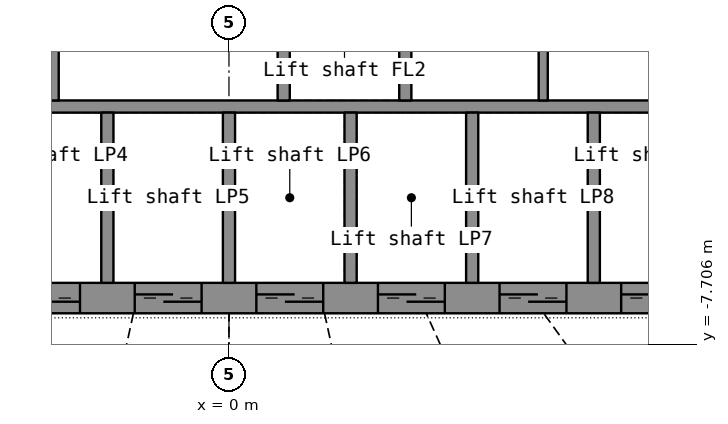
"""IFC4 building model, lengths in metres.
Left out: names, types, materials, properties, quantities, classifications, styles, units other than length and angle.
Written with IfcOpenShell. Run it as: python <this file> out.ifc"""

import sys

from ifc_helpers import new_model, si_unit, direction, frame, frame_2d, origin, place, context, subcontext, project, spatial, rectangle, extrude, element, fill, save


model = new_model("IFC4")
c1 = context("Model", 3, precision=1e-05, world=origin(), true_north=direction((0.0, 1.0)))
c2 = subcontext(c1, "Body", "Model", "MODEL_VIEW")
j1 = project(units=[si_unit("LENGTHUNIT", "METRE"), si_unit("PLANEANGLEUNIT", "RADIAN")], contexts=[c1])
p1 = place(None, origin())
s1 = spatial("IfcSite", under=j1, at=p1, CompositionType="ELEMENT")
p2 = place(p1, origin())
s2 = spatial("IfcBuilding", under=s1, at=p2, CompositionType="ELEMENT")
p3 = place(p2, frame((0.0, 0.0, 145.2)))
s3 = spatial("IfcBuildingStorey", under=s2, at=p3, CompositionType="ELEMENT", Elevation=145.2)
p4 = place(p3, frame((-11.5, -6.95, 0.0), z_axis=(0.0, 0.0, 1.0), x_axis=(1.0, 0.0, 0.0)))
e1 = element("IfcWall", 1, at=p4, inside=s3, PredefinedType="SHEAR", context=c2, shape_type="SweptSolid", body=[
    extrude(rectangle(XDim=23.0, YDim=0.5, at=frame_2d((11.5, 0.0))), origin(), (0.0, 0.0, 1.0), 7.0),
])
p5 = place(p4, frame((1.95, 0.0, 0.0)))
e2 = element("IfcOpeningElement", 2, at=p5, cuts=e1, PredefinedType="OPENING", context=c2, shape_type="SweptSolid", body=[
    extrude(rectangle(XDim=1.1, YDim=2.2, at=frame_2d((0.55, 1.1))), frame((0.0, 0.26, 0.0), z_axis=(0.0, -1.0, 0.0), x_axis=(1.0, 0.0, 0.0)), (0.0, 0.0, 1.0), 0.52),
])
p6 = place(p4, frame((3.95, 0.0, 0.0)))
e3 = element("IfcOpeningElement", 3, at=p6, cuts=e1, PredefinedType="OPENING", context=c2, shape_type="SweptSolid", body=[
    extrude(rectangle(XDim=1.1, YDim=2.2, at=frame_2d((0.55, 1.1))), frame((0.0, 0.26, 0.0), z_axis=(0.0, -1.0, 0.0), x_axis=(1.0, 0.0, 0.0)), (0.0, 0.0, 1.0), 0.52),
])
p7 = place(p4, frame((5.95, 0.0, 0.0)))
e4 = element("IfcOpeningElement", 4, at=p7, cuts=e1, PredefinedType="OPENING", context=c2, shape_type="SweptSolid", body=[
    extrude(rectangle(XDim=1.1, YDim=2.2, at=frame_2d((0.55, 1.1))), frame((0.0, 0.26, 0.0), z_axis=(0.0, -1.0, 0.0), x_axis=(1.0, 0.0, 0.0)), (0.0, 0.0, 1.0), 0.52),
])
p8 = place(p4, frame((7.95, 0.0, 0.0)))
e5 = element("IfcOpeningElement", 5, at=p8, cuts=e1, PredefinedType="OPENING", context=c2, shape_type="SweptSolid", body=[
    extrude(rectangle(XDim=1.1, YDim=2.2, at=frame_2d((0.55, 1.1))), frame((0.0, 0.26, 0.0), z_axis=(0.0, -1.0, 0.0), x_axis=(1.0, 0.0, 0.0)), (0.0, 0.0, 1.0), 0.52),
])
p9 = place(p4, frame((9.95, 0.0, 0.0)))
e6 = element("IfcOpeningElement", 6, at=p9, cuts=e1, PredefinedType="OPENING", context=c2, shape_type="SweptSolid", body=[
    extrude(rectangle(XDim=1.1, YDim=2.2, at=frame_2d((0.55, 1.1))), frame((0.0, 0.26, 0.0), z_axis=(0.0, -1.0, 0.0), x_axis=(1.0, 0.0, 0.0)), (0.0, 0.0, 1.0), 0.52),
])
p10 = place(p4, frame((11.95, 0.0, 0.0)))
e7 = element("IfcOpeningElement", 7, at=p10, cuts=e1, PredefinedType="OPENING", context=c2, shape_type="SweptSolid", body=[
    extrude(rectangle(XDim=1.1, YDim=2.2, at=frame_2d((0.55, 1.1))), frame((0.0, 0.26, 0.0), z_axis=(0.0, -1.0, 0.0), x_axis=(1.0, 0.0, 0.0)), (0.0, 0.0, 1.0), 0.52),
])
p11 = place(p4, frame((13.95, 0.0, 0.0)))
e8 = element("IfcOpeningElement", 8, at=p11, cuts=e1, PredefinedType="OPENING", context=c2, shape_type="SweptSolid", body=[
    extrude(rectangle(XDim=1.1, YDim=2.2, at=frame_2d((0.55, 1.1))), frame((0.0, 0.26, 0.0), z_axis=(0.0, -1.0, 0.0), x_axis=(1.0, 0.0, 0.0)), (0.0, 0.0, 1.0), 0.52),
])
p12 = place(p4, frame((15.95, 0.0, 0.0)))
e9 = element("IfcOpeningElement", 9, at=p12, cuts=e1, PredefinedType="OPENING", context=c2, shape_type="SweptSolid", body=[
    extrude(rectangle(XDim=1.1, YDim=2.2, at=frame_2d((0.55, 1.1))), frame((0.0, 0.26, 0.0), z_axis=(0.0, -1.0, 0.0), x_axis=(1.0, 0.0, 0.0)), (0.0, 0.0, 1.0), 0.52),
])
p13 = place(p4, frame((17.95, 0.0, 0.0)))
e10 = element("IfcOpeningElement", 10, at=p13, cuts=e1, PredefinedType="OPENING", context=c2, shape_type="SweptSolid", body=[
    extrude(rectangle(XDim=1.1, YDim=2.2, at=frame_2d((0.55, 1.1))), frame((0.0, 0.26, 0.0), z_axis=(0.0, -1.0, 0.0), x_axis=(1.0, 0.0, 0.0)), (0.0, 0.0, 1.0), 0.52),
])
p14 = place(p4, frame((19.95, 0.0, 0.0)))
e11 = element("IfcOpeningElement", 11, at=p14, cuts=e1, PredefinedType="OPENING", context=c2, shape_type="SweptSolid", body=[
    extrude(rectangle(XDim=1.1, YDim=2.2, at=frame_2d((0.55, 1.1))), frame((0.0, 0.26, 0.0), z_axis=(0.0, -1.0, 0.0), x_axis=(1.0, 0.0, 0.0)), (0.0, 0.0, 1.0), 0.52),
])
p15 = place(p4, frame((0.3, 0.0, 0.0)))
e12 = element("IfcOpeningElement", 12, at=p15, cuts=e1, PredefinedType="OPENING", context=c2, shape_type="SweptSolid", body=[
    extrude(rectangle(XDim=0.8, YDim=2.05, at=frame_2d((0.4, 1.025))), frame((0.0, 0.26, 0.0), z_axis=(0.0, -1.0, 0.0), x_axis=(1.0, 0.0, 0.0)), (0.0, 0.0, 1.0), 0.52),
])
p16 = place(p4, frame((21.9, 0.0, 0.0)))
e13 = element("IfcOpeningElement", 13, at=p16, cuts=e1, PredefinedType="OPENING", context=c2, shape_type="SweptSolid", body=[
    extrude(rectangle(XDim=0.8, YDim=2.05, at=frame_2d((0.4, 1.025))), frame((0.0, 0.26, 0.0), z_axis=(0.0, -1.0, 0.0), x_axis=(1.0, 0.0, 0.0)), (0.0, 0.0, 1.0), 0.52),
])
p17 = place(p3, frame((-11.5, -3.8, 0.0), z_axis=(0.0, 0.0, 1.0), x_axis=(1.0, 0.0, 0.0)))
e14 = element("IfcWall", 14, at=p17, inside=s3, PredefinedType="SHEAR", context=c2, shape_type="SweptSolid", body=[
    extrude(rectangle(XDim=23.0, YDim=0.2, at=frame_2d((11.5, 0.0))), origin(), (0.0, 0.0, 1.0), 7.0),
])
for number, where, z_axis, x_axis in (
    (15, (-2.0, -6.7, 0.0), (0.0, 0.0, 1.0), (0.0, 1.0, 0.0)),
    (16, (0.0, -6.7, 0.0), (0.0, 0.0, 1.0), (0.0, 1.0, 0.0)),
    (17, (2.0, -6.7, 0.0), (0.0, 0.0, 1.0), (0.0, 1.0, 0.0)),
    (18, (4.0, -6.7, 0.0), (0.0, 0.0, 1.0), (0.0, 1.0, 0.0)),
    (19, (6.0, -6.7, 0.0), (0.0, 0.0, 1.0), (0.0, 1.0, 0.0)),
):
    element("IfcWall", number, at=place(p3, frame(where, z_axis=z_axis, x_axis=x_axis)), inside=s3, PredefinedType="SHEAR", context=c2, shape_type="SweptSolid", body=[
        extrude(rectangle(XDim=2.8, YDim=0.2, at=frame_2d((1.4, 0.0))), origin(), (0.0, 0.0, 1.0), 7.0),
    ])
p18 = place(p3, frame((-2.9, -3.7, 0.0), z_axis=(0.0, 0.0, 1.0), x_axis=(0.0, 1.0, 0.0)))
e20 = element("IfcWall", 20, at=p18, inside=s3, PredefinedType="SHEAR", context=c2, shape_type="SweptSolid", body=[
    extrude(rectangle(XDim=7.4, YDim=0.2, at=frame_2d((3.7, 0.0))), origin(), (0.0, 0.0, 1.0), 7.0),
])
p19 = place(p18, frame((3.1, 0.0, 0.0)))
e21 = element("IfcOpeningElement", 21, at=p19, cuts=e20, PredefinedType="OPENING", context=c2, shape_type="SweptSolid", body=[
    extrude(rectangle(XDim=1.2, YDim=2.2, at=frame_2d((0.6, 1.1))), frame((0.0, 0.11, 0.0), z_axis=(0.0, -1.0, 0.0), x_axis=(1.0, 0.0, 0.0)), (0.0, 0.0, 1.0), 0.22),
])
p20 = place(p3, frame((2.9, -3.7, 0.0), z_axis=(0.0, 0.0, 1.0), x_axis=(0.0, 1.0, 0.0)))
e22 = element("IfcWall", 22, at=p20, inside=s3, PredefinedType="SHEAR", context=c2, shape_type="SweptSolid", body=[
    extrude(rectangle(XDim=7.4, YDim=0.2, at=frame_2d((3.7, 0.0))), origin(), (0.0, 0.0, 1.0), 7.0),
])
p21 = place(p20, frame((3.1, 0.0, 0.0)))
e23 = element("IfcOpeningElement", 23, at=p21, cuts=e22, PredefinedType="OPENING", context=c2, shape_type="SweptSolid", body=[
    extrude(rectangle(XDim=1.2, YDim=2.2, at=frame_2d((0.6, 1.1))), frame((0.0, 0.11, 0.0), z_axis=(0.0, -1.0, 0.0), x_axis=(1.0, 0.0, 0.0)), (0.0, 0.0, 1.0), 0.22),
])
p22 = place(p3, frame((0.9, -3.7, 0.0), z_axis=(0.0, 0.0, 1.0), x_axis=(0.0, 1.0, 0.0)))
e24 = element("IfcWall", 24, at=p22, inside=s3, PredefinedType="SHEAR", context=c2, shape_type="SweptSolid", body=[
    extrude(rectangle(XDim=2.35, YDim=0.2, at=frame_2d((1.175, 0.0))), origin(), (0.0, 0.0, 1.0), 7.0),
])
p23 = place(p3, frame((5.168, -3.7, 0.0), z_axis=(0.0, 0.0, 1.0), x_axis=(0.0, 1.0, 0.0)))
e25 = element("IfcWall", 25, at=p23, inside=s3, PredefinedType="PARTITIONING", context=c2, shape_type="SweptSolid", body=[
    extrude(rectangle(XDim=2.35, YDim=0.15, at=frame_2d((1.175, 0.0))), origin(), (0.0, 0.0, 1.0), 7.0),
])
p24 = place(p8, origin())
e26 = element("IfcDoor", 26, at=p24, inside=s3, OperationType="DOUBLE_DOOR_SLIDING", PredefinedType="DOOR", context=c2, shape_type="SweptSolid", body=[
    extrude(rectangle(XDim=1.1, YDim=2.2, at=frame_2d((0.55, 1.1))), frame((0.0, 0.025, 0.0), z_axis=(0.0, -1.0, 0.0), x_axis=(1.0, 0.0, 0.0)), (0.0, 0.0, 1.0), 0.05),
])
fill(e5, e26)
p25 = place(p9, origin())
e27 = element("IfcDoor", 27, at=p25, inside=s3, OperationType="DOUBLE_DOOR_SLIDING", PredefinedType="DOOR", context=c2, shape_type="SweptSolid", body=[
    extrude(rectangle(XDim=1.1, YDim=2.2, at=frame_2d((0.55, 1.1))), frame((0.0, 0.025, 0.0), z_axis=(0.0, -1.0, 0.0), x_axis=(1.0, 0.0, 0.0)), (0.0, 0.0, 1.0), 0.05),
])
fill(e6, e27)
p26 = place(p10, origin())
e28 = element("IfcDoor", 28, at=p26, inside=s3, OperationType="DOUBLE_DOOR_SLIDING", PredefinedType="DOOR", context=c2, shape_type="SweptSolid", body=[
    extrude(rectangle(XDim=1.1, YDim=2.2, at=frame_2d((0.55, 1.1))), frame((0.0, 0.025, 0.0), z_axis=(0.0, -1.0, 0.0), x_axis=(1.0, 0.0, 0.0)), (0.0, 0.0, 1.0), 0.05),
])
fill(e7, e28)
p27 = place(p11, origin())
e29 = element("IfcDoor", 29, at=p27, inside=s3, OperationType="DOUBLE_DOOR_SLIDING", PredefinedType="DOOR", context=c2, shape_type="SweptSolid", body=[
    extrude(rectangle(XDim=1.1, YDim=2.2, at=frame_2d((0.55, 1.1))), frame((0.0, 0.025, 0.0), z_axis=(0.0, -1.0, 0.0), x_axis=(1.0, 0.0, 0.0)), (0.0, 0.0, 1.0), 0.05),
])
fill(e8, e29)
p28 = place(p12, origin())
e30 = element("IfcDoor", 30, at=p28, inside=s3, OperationType="DOUBLE_DOOR_SLIDING", PredefinedType="DOOR", context=c2, shape_type="SweptSolid", body=[
    extrude(rectangle(XDim=1.1, YDim=2.2, at=frame_2d((0.55, 1.1))), frame((0.0, 0.025, 0.0), z_axis=(0.0, -1.0, 0.0), x_axis=(1.0, 0.0, 0.0)), (0.0, 0.0, 1.0), 0.05),
])
fill(e9, e30)
p29 = place(p13, origin())
e31 = element("IfcDoor", 31, at=p29, inside=s3, OperationType="DOUBLE_DOOR_SLIDING", PredefinedType="DOOR", context=c2, shape_type="SweptSolid", body=[
    extrude(rectangle(XDim=1.1, YDim=2.2, at=frame_2d((0.55, 1.1))), frame((0.0, 0.025, 0.0), z_axis=(0.0, -1.0, 0.0), x_axis=(1.0, 0.0, 0.0)), (0.0, 0.0, 1.0), 0.05),
])
fill(e10, e31)
save(model, sys.argv[1])
